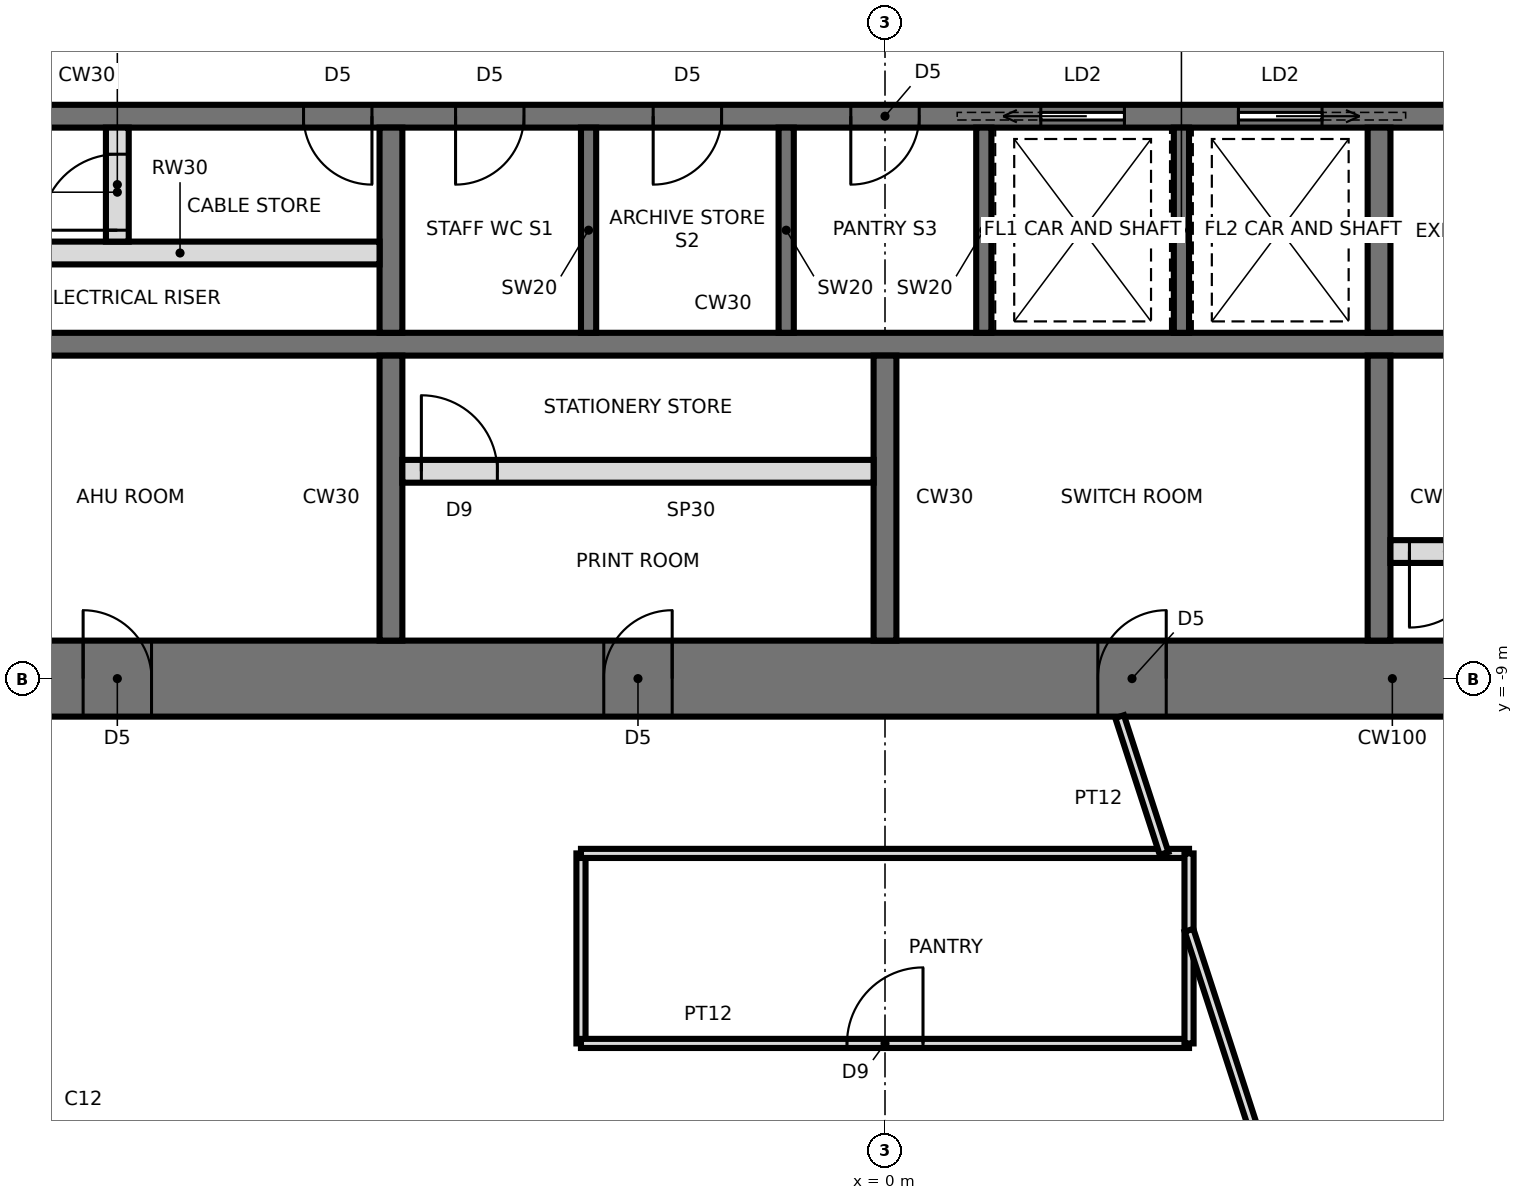
"""IFC4 building model, lengths in metres.
Left out: names, types, materials, properties, quantities, classifications, styles, units other than length and angle.
Written with IfcOpenShell. Run it as: python <this file> out.ifc"""

import sys

from ifc_helpers import new_model, si_unit, direction, frame, frame_2d, origin, place, context, subcontext, project, spatial, rectangle, extrude, element, fill, save


model = new_model("IFC4")
c1 = context("Model", 3, precision=1e-05, world=origin(), true_north=direction((0.0, 1.0)))
c2 = subcontext(c1, "Body", "Model", "MODEL_VIEW")
j1 = project(units=[si_unit("LENGTHUNIT", "METRE"), si_unit("PLANEANGLEUNIT", "RADIAN")], contexts=[c1])
p1 = place(None, origin())
s1 = spatial("IfcSite", under=j1, at=p1, CompositionType="ELEMENT")
p2 = place(p1, origin())
s2 = spatial("IfcBuilding", under=s1, at=p2, CompositionType="ELEMENT")
p3 = place(p2, frame((0.0, 0.0, 256.0)))
s3 = spatial("IfcBuildingStorey", under=s2, at=p3, CompositionType="ELEMENT", Elevation=256.0)
p4 = place(p3, frame((-13.2, -9.0, 0.0), z_axis=(0.0, 0.0, 1.0), x_axis=(1.0, 0.0, 0.0)))
e1 = element("IfcWall", 1, at=p4, inside=s3, PredefinedType="SHEAR", context=c2, shape_type="SweptSolid", body=[
    extrude(rectangle(XDim=26.4, YDim=1.0, at=frame_2d((13.2, 0.0))), origin(), (0.0, 0.0, 1.0), 4.2),
])
p5 = place(p4, frame((2.65, 0.0, 0.0)))
e2 = element("IfcOpeningElement", 2, at=p5, cuts=e1, PredefinedType="OPENING", context=c2, shape_type="SweptSolid", body=[
    extrude(rectangle(XDim=0.9, YDim=2.1, at=frame_2d((0.45, 1.05))), frame((0.0, 0.51, 0.0), z_axis=(0.0, -1.0, 0.0), x_axis=(1.0, 0.0, 0.0)), (0.0, 0.0, 1.0), 1.02),
])
p6 = place(p4, frame((9.5, 0.0, 0.0)))
e3 = element("IfcOpeningElement", 3, at=p6, cuts=e1, PredefinedType="OPENING", context=c2, shape_type="SweptSolid", body=[
    extrude(rectangle(XDim=0.9, YDim=2.1, at=frame_2d((0.45, 1.05))), frame((0.0, 0.51, 0.0), z_axis=(0.0, -1.0, 0.0), x_axis=(1.0, 0.0, 0.0)), (0.0, 0.0, 1.0), 1.02),
])
p7 = place(p4, frame((16.0, 0.0, 0.0)))
e4 = element("IfcOpeningElement", 4, at=p7, cuts=e1, PredefinedType="OPENING", context=c2, shape_type="SweptSolid", body=[
    extrude(rectangle(XDim=0.9, YDim=2.1, at=frame_2d((0.45, 1.05))), frame((0.0, 0.51, 0.0), z_axis=(0.0, -1.0, 0.0), x_axis=(1.0, 0.0, 0.0)), (0.0, 0.0, 1.0), 1.02),
])
p8 = place(p4, frame((22.85, 0.0, 0.0)))
e5 = element("IfcOpeningElement", 5, at=p8, cuts=e1, PredefinedType="OPENING", context=c2, shape_type="SweptSolid", body=[
    extrude(rectangle(XDim=0.9, YDim=2.1, at=frame_2d((0.45, 1.05))), frame((0.0, 0.51, 0.0), z_axis=(0.0, -1.0, 0.0), x_axis=(1.0, 0.0, 0.0)), (0.0, 0.0, 1.0), 1.02),
])
p9 = place(p3, frame((-13.2, -1.6, 0.0), z_axis=(0.0, 0.0, 1.0), x_axis=(1.0, 0.0, 0.0)))
e6 = element("IfcWall", 6, at=p9, inside=s3, PredefinedType="SHEAR", context=c2, shape_type="SweptSolid", body=[
    extrude(rectangle(XDim=26.4, YDim=0.3, at=frame_2d((13.2, 0.0))), origin(), (0.0, 0.0, 1.0), 4.2),
])
p10 = place(p9, frame((25.15, 0.0, 0.0)))
e7 = element("IfcOpeningElement", 7, at=p10, cuts=e6, PredefinedType="OPENING", context=c2, shape_type="SweptSolid", body=[
    extrude(rectangle(XDim=1.0, YDim=2.1, at=frame_2d((0.5, 1.05))), frame((0.0, 0.16, 0.0), z_axis=(0.0, -1.0, 0.0), x_axis=(1.0, 0.0, 0.0)), (0.0, 0.0, 1.0), 0.32),
])
p11 = place(p9, frame((7.55, 0.0, 0.0)))
e8 = element("IfcOpeningElement", 8, at=p11, cuts=e6, PredefinedType="OPENING", context=c2, shape_type="SweptSolid", body=[
    extrude(rectangle(XDim=0.9, YDim=2.1, at=frame_2d((0.45, 1.05))), frame((0.0, 0.16, 0.0), z_axis=(0.0, -1.0, 0.0), x_axis=(1.0, 0.0, 0.0)), (0.0, 0.0, 1.0), 0.32),
])
p12 = place(p9, frame((10.15, 0.0, 0.0)))
e9 = element("IfcOpeningElement", 9, at=p12, cuts=e6, PredefinedType="OPENING", context=c2, shape_type="SweptSolid", body=[
    extrude(rectangle(XDim=0.9, YDim=2.1, at=frame_2d((0.45, 1.05))), frame((0.0, 0.16, 0.0), z_axis=(0.0, -1.0, 0.0), x_axis=(1.0, 0.0, 0.0)), (0.0, 0.0, 1.0), 0.32),
])
p13 = place(p9, frame((12.75, 0.0, 0.0)))
e10 = element("IfcOpeningElement", 10, at=p13, cuts=e6, PredefinedType="OPENING", context=c2, shape_type="SweptSolid", body=[
    extrude(rectangle(XDim=0.9, YDim=2.1, at=frame_2d((0.45, 1.05))), frame((0.0, 0.16, 0.0), z_axis=(0.0, -1.0, 0.0), x_axis=(1.0, 0.0, 0.0)), (0.0, 0.0, 1.0), 0.32),
])
p14 = place(p9, frame((15.25, 0.0, 0.0)))
e11 = element("IfcOpeningElement", 11, at=p14, cuts=e6, PredefinedType="OPENING", context=c2, shape_type="SweptSolid", body=[
    extrude(rectangle(XDim=1.1, YDim=2.3, at=frame_2d((0.55, 1.15))), frame((0.0, 0.16, 0.0), z_axis=(0.0, -1.0, 0.0), x_axis=(1.0, 0.0, 0.0)), (0.0, 0.0, 1.0), 0.32),
])
p15 = place(p9, frame((17.85, 0.0, 0.0)))
e12 = element("IfcOpeningElement", 12, at=p15, cuts=e6, PredefinedType="OPENING", context=c2, shape_type="SweptSolid", body=[
    extrude(rectangle(XDim=1.1, YDim=2.3, at=frame_2d((0.55, 1.15))), frame((0.0, 0.16, 0.0), z_axis=(0.0, -1.0, 0.0), x_axis=(1.0, 0.0, 0.0)), (0.0, 0.0, 1.0), 0.32),
])
p16 = place(p9, frame((5.55, 0.0, 0.0)))
e13 = element("IfcOpeningElement", 13, at=p16, cuts=e6, PredefinedType="OPENING", context=c2, shape_type="SweptSolid", body=[
    extrude(rectangle(XDim=0.9, YDim=2.1, at=frame_2d((0.45, 1.05))), frame((0.0, 0.16, 0.0), z_axis=(0.0, -1.0, 0.0), x_axis=(1.0, 0.0, 0.0)), (0.0, 0.0, 1.0), 0.32),
])
p17 = place(p3, frame((-13.2, -4.6, 0.0), z_axis=(0.0, 0.0, 1.0), x_axis=(1.0, 0.0, 0.0)))
e14 = element("IfcWall", 14, at=p17, inside=s3, PredefinedType="SHEAR", context=c2, shape_type="SweptSolid", body=[
    extrude(rectangle(XDim=26.4, YDim=0.3, at=frame_2d((13.2, 0.0))), origin(), (0.0, 0.0, 1.0), 4.2),
])
p18 = place(p3, frame((-6.5, -1.75, 0.0), z_axis=(0.0, 0.0, 1.0), x_axis=(0.0, -1.0, 0.0)))
e15 = element("IfcWall", 15, at=p18, inside=s3, PredefinedType="SHEAR", context=c2, shape_type="SweptSolid", body=[
    extrude(rectangle(XDim=2.7, YDim=0.3, at=frame_2d((1.35, 0.0))), origin(), (0.0, 0.0, 1.0), 4.2),
])
p19 = place(p3, frame((-6.5, -4.75, 0.0), z_axis=(0.0, 0.0, 1.0), x_axis=(0.0, -1.0, 0.0)))
e16 = element("IfcWall", 16, at=p19, inside=s3, PredefinedType="SHEAR", context=c2, shape_type="SweptSolid", body=[
    extrude(rectangle(XDim=3.75, YDim=0.3, at=frame_2d((1.875, 0.0))), origin(), (0.0, 0.0, 1.0), 4.2),
])
p20 = place(p3, frame((6.5, -1.75, 0.0), z_axis=(0.0, 0.0, 1.0), x_axis=(0.0, -1.0, 0.0)))
e17 = element("IfcWall", 17, at=p20, inside=s3, PredefinedType="SHEAR", context=c2, shape_type="SweptSolid", body=[
    extrude(rectangle(XDim=2.7, YDim=0.3, at=frame_2d((1.35, 0.0))), origin(), (0.0, 0.0, 1.0), 4.2),
])
p21 = place(p3, frame((6.5, -4.75, 0.0), z_axis=(0.0, 0.0, 1.0), x_axis=(0.0, -1.0, 0.0)))
e18 = element("IfcWall", 18, at=p21, inside=s3, PredefinedType="SHEAR", context=c2, shape_type="SweptSolid", body=[
    extrude(rectangle(XDim=3.75, YDim=0.3, at=frame_2d((1.875, 0.0))), origin(), (0.0, 0.0, 1.0), 4.2),
])
for number, where, z_axis, x_axis in (
    (19, (-3.9, -1.75, 0.0), (0.0, 0.0, 1.0), (0.0, -1.0, 0.0)),
    (20, (-1.3, -1.75, 0.0), (0.0, 0.0, 1.0), (0.0, -1.0, 0.0)),
    (21, (1.3, -1.75, 0.0), (0.0, 0.0, 1.0), (0.0, -1.0, 0.0)),
    (22, (3.9, -1.75, 0.0), (0.0, 0.0, 1.0), (0.0, -1.0, 0.0)),
):
    element("IfcWall", number, at=place(p3, frame(where, z_axis=z_axis, x_axis=x_axis)), inside=s3, PredefinedType="SHEAR", context=c2, shape_type="SweptSolid", body=[
        extrude(rectangle(XDim=2.7, YDim=0.2, at=frame_2d((1.35, 0.0))), origin(), (0.0, 0.0, 1.0), 4.2),
    ])
p22 = place(p3, frame((0.0, -4.75, 0.0), z_axis=(0.0, 0.0, 1.0), x_axis=(0.0, -1.0, 0.0)))
e23 = element("IfcWall", 23, at=p22, inside=s3, PredefinedType="SHEAR", context=c2, shape_type="SweptSolid", body=[
    extrude(rectangle(XDim=3.75, YDim=0.3, at=frame_2d((1.875, 0.0))), origin(), (0.0, 0.0, 1.0), 4.2),
])
p23 = place(p3, frame((-6.35, -6.272, 0.0), z_axis=(0.0, 0.0, 1.0), x_axis=(1.0, 0.0, 0.0)))
e24 = element("IfcWall", 24, at=p23, inside=s3, PredefinedType="PARTITIONING", context=c2, shape_type="SweptSolid", body=[
    extrude(rectangle(XDim=6.2, YDim=0.3, at=frame_2d((3.1, 0.0))), origin(), (0.0, 0.0, 1.0), 4.04),
])
p24 = place(p23, frame((0.25, 0.0, 0.0)))
e25 = element("IfcOpeningElement", 25, at=p24, cuts=e24, PredefinedType="OPENING", context=c2, shape_type="SweptSolid", body=[
    extrude(rectangle(XDim=1.0, YDim=2.4, at=frame_2d((0.5, 1.2))), frame((0.0, 0.16, 0.0), z_axis=(0.0, -1.0, 0.0), x_axis=(1.0, 0.0, 0.0)), (0.0, 0.0, 1.0), 0.32),
])
p25 = place(p3, frame((6.65, -7.328, 0.0), z_axis=(0.0, 0.0, 1.0), x_axis=(1.0, 0.0, 0.0)))
e26 = element("IfcWall", 26, at=p25, inside=s3, PredefinedType="PARTITIONING", context=c2, shape_type="SweptSolid", body=[
    extrude(rectangle(XDim=6.55, YDim=0.3, at=frame_2d((3.275, 0.0))), origin(), (0.0, 0.0, 1.0), 4.04),
])
p26 = place(p25, frame((0.25, 0.0, 0.0)))
e27 = element("IfcOpeningElement", 27, at=p26, cuts=e26, PredefinedType="OPENING", context=c2, shape_type="SweptSolid", body=[
    extrude(rectangle(XDim=1.0, YDim=2.4, at=frame_2d((0.5, 1.2))), frame((0.0, 0.16, 0.0), z_axis=(0.0, -1.0, 0.0), x_axis=(1.0, 0.0, 0.0)), (0.0, 0.0, 1.0), 0.32),
])
p27 = place(p3, frame((-13.2, -3.4, 0.0), z_axis=(0.0, 0.0, 1.0), x_axis=(1.0, 0.0, 0.0)))
e28 = element("IfcWall", 28, at=p27, inside=s3, PredefinedType="SOLIDWALL", context=c2, shape_type="SweptSolid", body=[
    extrude(rectangle(XDim=6.55, YDim=0.3, at=frame_2d((3.275, 0.0))), origin(), (0.0, 0.0, 1.0), 4.04),
])
p28 = place(p27, frame((0.25, 0.0, 0.0)))
e29 = element("IfcOpeningElement", 29, at=p28, cuts=e28, PredefinedType="OPENING", context=c2, shape_type="SweptSolid", body=[
    extrude(rectangle(XDim=0.9, YDim=2.1, at=frame_2d((0.45, 1.05))), frame((0.0, 0.16, 0.0), z_axis=(0.0, -1.0, 0.0), x_axis=(1.0, 0.0, 0.0)), (0.0, 0.0, 1.0), 0.32),
])
p29 = place(p3, frame((-10.1, -3.25, 0.0), z_axis=(0.0, 0.0, 1.0), x_axis=(0.0, 1.0, 0.0)))
e30 = element("IfcWall", 30, at=p29, inside=s3, PredefinedType="PARTITIONING", context=c2, shape_type="SweptSolid", body=[
    extrude(rectangle(XDim=1.5, YDim=0.3, at=frame_2d((0.75, 0.0))), origin(), (0.0, 0.0, 1.0), 4.04),
])
p30 = place(p29, frame((0.15, 0.0, 0.0)))
e31 = element("IfcOpeningElement", 31, at=p30, cuts=e30, PredefinedType="OPENING", context=c2, shape_type="SweptSolid", body=[
    extrude(rectangle(XDim=1.0, YDim=2.4, at=frame_2d((0.5, 1.2))), frame((0.0, 0.16, 0.0), z_axis=(0.0, -1.0, 0.0), x_axis=(1.0, 0.0, 0.0)), (0.0, 0.0, 1.0), 0.32),
])
p31 = place(p3, frame((-4.0, -11.3, 0.0), z_axis=(0.0, 0.0, 1.0), x_axis=(0.0, -1.0, 0.0)))
e32 = element("IfcWall", 32, at=p31, inside=s3, PredefinedType="PARTITIONING", context=c2, shape_type="SweptSolid", body=[
    extrude(rectangle(XDim=2.5, YDim=0.12, at=frame_2d((1.25, 0.0))), origin(), (0.0, 0.0, 1.0), 4.04),
])
p32 = place(p3, frame((-4.0, -13.8, 0.0), z_axis=(0.0, 0.0, 1.0), x_axis=(1.0, 0.0, 0.0)))
e33 = element("IfcWall", 33, at=p32, inside=s3, PredefinedType="PARTITIONING", context=c2, shape_type="SweptSolid", body=[
    extrude(rectangle(XDim=8.0, YDim=0.12, at=frame_2d((4.0, 0.0))), origin(), (0.0, 0.0, 1.0), 4.04),
])
p33 = place(p32, frame((3.5, 0.0, 0.0)))
e34 = element("IfcOpeningElement", 34, at=p33, cuts=e33, PredefinedType="OPENING", context=c2, shape_type="SweptSolid", body=[
    extrude(rectangle(XDim=1.0, YDim=2.4, at=frame_2d((0.5, 1.2))), frame((0.0, 0.07, 0.0), z_axis=(0.0, -1.0, 0.0), x_axis=(1.0, 0.0, 0.0)), (0.0, 0.0, 1.0), 0.14),
])
p34 = place(p3, frame((4.0, -11.3, 0.0), z_axis=(0.0, 0.0, 1.0), x_axis=(-1.0, 0.0, 0.0)))
e35 = element("IfcWall", 35, at=p34, inside=s3, PredefinedType="PARTITIONING", context=c2, shape_type="SweptSolid", body=[
    extrude(rectangle(XDim=8.0, YDim=0.12, at=frame_2d((4.0, 0.0))), origin(), (0.0, 0.0, 1.0), 4.04),
])
p35 = place(p3, frame((4.0, -13.8, 0.0), z_axis=(0.0, 0.0, 1.0), x_axis=(0.0, 1.0, 0.0)))
e36 = element("IfcWall", 36, at=p35, inside=s3, PredefinedType="PARTITIONING", context=c2, shape_type="SweptSolid", body=[
    extrude(rectangle(XDim=2.5, YDim=0.12, at=frame_2d((1.25, 0.0))), origin(), (0.0, 0.0, 1.0), 4.04),
])
p36 = place(p3, frame((6.137, -18.889, 0.0), z_axis=(0.0, 0.0, 1.0), x_axis=(-0.309007859613, 0.951059484311, 0.0)))
e37 = element("IfcWall", 37, at=p36, inside=s3, PredefinedType="PARTITIONING", context=c2, shape_type="SweptSolid", body=[
    extrude(rectangle(XDim=6.917, YDim=0.12, at=frame_2d((3.458, 0.0))), origin(), (0.0, 0.0, 1.0), 3.24),
])
p37 = place(p3, frame((3.672, -11.3, 0.0), z_axis=(0.0, 0.0, 1.0), x_axis=(-0.309059822154, 0.95104259964, 0.0)))
e38 = element("IfcWall", 38, at=p37, inside=s3, PredefinedType="PARTITIONING", context=c2, shape_type="SweptSolid", body=[
    extrude(rectangle(XDim=1.893, YDim=0.12, at=frame_2d((0.946, 0.0))), origin(), (0.0, 0.0, 1.0), 3.24),
])
p38 = place(p11, frame((0.9, 0.0, 0.0), z_axis=(0.0, 0.0, 1.0), x_axis=(-1.0, 0.0, 0.0)))
e39 = element("IfcDoor", 39, at=p38, inside=s3, OperationType="SINGLE_SWING_RIGHT", PredefinedType="DOOR", context=c2, shape_type="SweptSolid", body=[
    extrude(rectangle(XDim=0.9, YDim=2.1, at=frame_2d((0.45, 1.05))), frame((0.0, 0.025, 0.0), z_axis=(0.0, -1.0, 0.0), x_axis=(1.0, 0.0, 0.0)), (0.0, 0.0, 1.0), 0.05),
])
fill(e8, e39)
p39 = place(p12, frame((0.9, 0.0, 0.0), z_axis=(0.0, 0.0, 1.0), x_axis=(-1.0, 0.0, 0.0)))
e40 = element("IfcDoor", 40, at=p39, inside=s3, OperationType="SINGLE_SWING_RIGHT", PredefinedType="DOOR", context=c2, shape_type="SweptSolid", body=[
    extrude(rectangle(XDim=0.9, YDim=2.1, at=frame_2d((0.45, 1.05))), frame((0.0, 0.025, 0.0), z_axis=(0.0, -1.0, 0.0), x_axis=(1.0, 0.0, 0.0)), (0.0, 0.0, 1.0), 0.05),
])
fill(e9, e40)
p40 = place(p13, frame((0.9, 0.0, 0.0), z_axis=(0.0, 0.0, 1.0), x_axis=(-1.0, 0.0, 0.0)))
e41 = element("IfcDoor", 41, at=p40, inside=s3, OperationType="SINGLE_SWING_RIGHT", PredefinedType="DOOR", context=c2, shape_type="SweptSolid", body=[
    extrude(rectangle(XDim=0.9, YDim=2.1, at=frame_2d((0.45, 1.05))), frame((0.0, 0.025, 0.0), z_axis=(0.0, -1.0, 0.0), x_axis=(1.0, 0.0, 0.0)), (0.0, 0.0, 1.0), 0.05),
])
fill(e10, e41)
p41 = place(p14, frame((1.1, 0.0, 0.0), z_axis=(0.0, 0.0, 1.0), x_axis=(-1.0, 0.0, 0.0)))
e42 = element("IfcDoor", 42, at=p41, inside=s3, OperationType="SLIDING_TO_RIGHT", PredefinedType="DOOR", context=c2, shape_type="SweptSolid", body=[
    extrude(rectangle(XDim=1.1, YDim=2.3, at=frame_2d((0.55, 1.15))), frame((0.0, 0.025, 0.0), z_axis=(0.0, -1.0, 0.0), x_axis=(1.0, 0.0, 0.0)), (0.0, 0.0, 1.0), 0.05),
])
fill(e11, e42)
p42 = place(p15, frame((1.1, 0.0, 0.0), z_axis=(0.0, 0.0, 1.0), x_axis=(-1.0, 0.0, 0.0)))
e43 = element("IfcDoor", 43, at=p42, inside=s3, OperationType="SLIDING_TO_LEFT", PredefinedType="DOOR", context=c2, shape_type="SweptSolid", body=[
    extrude(rectangle(XDim=1.1, YDim=2.3, at=frame_2d((0.55, 1.15))), frame((0.0, 0.025, 0.0), z_axis=(0.0, -1.0, 0.0), x_axis=(1.0, 0.0, 0.0)), (0.0, 0.0, 1.0), 0.05),
])
fill(e12, e43)
p43 = place(p16, frame((0.9, 0.0, 0.0), z_axis=(0.0, 0.0, 1.0), x_axis=(-1.0, 0.0, 0.0)))
e44 = element("IfcDoor", 44, at=p43, inside=s3, OperationType="SINGLE_SWING_LEFT", PredefinedType="DOOR", context=c2, shape_type="SweptSolid", body=[
    extrude(rectangle(XDim=0.9, YDim=2.1, at=frame_2d((0.45, 1.05))), frame((0.0, 0.025, 0.0), z_axis=(0.0, -1.0, 0.0), x_axis=(1.0, 0.0, 0.0)), (0.0, 0.0, 1.0), 0.05),
])
fill(e13, e44)
p44 = place(p5, origin())
e45 = element("IfcDoor", 45, at=p44, inside=s3, OperationType="SINGLE_SWING_LEFT", PredefinedType="DOOR", context=c2, shape_type="SweptSolid", body=[
    extrude(rectangle(XDim=0.82, YDim=2.06, at=frame_2d((0.45, 1.03))), frame((0.0, 0.025, 0.0), z_axis=(0.0, -1.0, 0.0), x_axis=(1.0, 0.0, 0.0)), (0.0, 0.0, 1.0), 0.05),
    extrude(rectangle(XDim=0.04, YDim=2.1, at=frame_2d((0.02, 1.05))), frame((0.0, 0.25, 0.0), z_axis=(0.0, -1.0, 0.0), x_axis=(1.0, 0.0, 0.0)), (0.0, 0.0, 1.0), 0.5),
    extrude(rectangle(XDim=0.04, YDim=2.1, at=frame_2d((0.88, 1.05))), frame((0.0, 0.25, 0.0), z_axis=(0.0, -1.0, 0.0), x_axis=(1.0, 0.0, 0.0)), (0.0, 0.0, 1.0), 0.5),
    extrude(rectangle(XDim=0.82, YDim=0.04, at=frame_2d((0.45, 2.08))), frame((0.0, 0.25, 0.0), z_axis=(0.0, -1.0, 0.0), x_axis=(1.0, 0.0, 0.0)), (0.0, 0.0, 1.0), 0.5),
])
fill(e2, e45)
p45 = place(p6, origin())
e46 = element("IfcDoor", 46, at=p45, inside=s3, OperationType="SINGLE_SWING_RIGHT", PredefinedType="DOOR", context=c2, shape_type="SweptSolid", body=[
    extrude(rectangle(XDim=0.82, YDim=2.06, at=frame_2d((0.45, 1.03))), frame((0.0, 0.025, 0.0), z_axis=(0.0, -1.0, 0.0), x_axis=(1.0, 0.0, 0.0)), (0.0, 0.0, 1.0), 0.05),
    extrude(rectangle(XDim=0.04, YDim=2.1, at=frame_2d((0.02, 1.05))), frame((0.0, 0.25, 0.0), z_axis=(0.0, -1.0, 0.0), x_axis=(1.0, 0.0, 0.0)), (0.0, 0.0, 1.0), 0.5),
    extrude(rectangle(XDim=0.04, YDim=2.1, at=frame_2d((0.88, 1.05))), frame((0.0, 0.25, 0.0), z_axis=(0.0, -1.0, 0.0), x_axis=(1.0, 0.0, 0.0)), (0.0, 0.0, 1.0), 0.5),
    extrude(rectangle(XDim=0.82, YDim=0.04, at=frame_2d((0.45, 2.08))), frame((0.0, 0.25, 0.0), z_axis=(0.0, -1.0, 0.0), x_axis=(1.0, 0.0, 0.0)), (0.0, 0.0, 1.0), 0.5),
])
fill(e3, e46)
p46 = place(p7, origin())
e47 = element("IfcDoor", 47, at=p46, inside=s3, OperationType="SINGLE_SWING_RIGHT", PredefinedType="DOOR", context=c2, shape_type="SweptSolid", body=[
    extrude(rectangle(XDim=0.82, YDim=2.06, at=frame_2d((0.45, 1.03))), frame((0.0, 0.025, 0.0), z_axis=(0.0, -1.0, 0.0), x_axis=(1.0, 0.0, 0.0)), (0.0, 0.0, 1.0), 0.05),
    extrude(rectangle(XDim=0.04, YDim=2.1, at=frame_2d((0.02, 1.05))), frame((0.0, 0.25, 0.0), z_axis=(0.0, -1.0, 0.0), x_axis=(1.0, 0.0, 0.0)), (0.0, 0.0, 1.0), 0.5),
    extrude(rectangle(XDim=0.04, YDim=2.1, at=frame_2d((0.88, 1.05))), frame((0.0, 0.25, 0.0), z_axis=(0.0, -1.0, 0.0), x_axis=(1.0, 0.0, 0.0)), (0.0, 0.0, 1.0), 0.5),
    extrude(rectangle(XDim=0.82, YDim=0.04, at=frame_2d((0.45, 2.08))), frame((0.0, 0.25, 0.0), z_axis=(0.0, -1.0, 0.0), x_axis=(1.0, 0.0, 0.0)), (0.0, 0.0, 1.0), 0.5),
])
fill(e4, e47)
p47 = place(p24, origin())
e48 = element("IfcDoor", 48, at=p47, inside=s3, OperationType="SINGLE_SWING_LEFT", PredefinedType="DOOR", context=c2, shape_type="SweptSolid", body=[
    extrude(rectangle(XDim=1.0, YDim=2.4, at=frame_2d((0.5, 1.2))), frame((0.0, 0.025, 0.0), z_axis=(0.0, -1.0, 0.0), x_axis=(1.0, 0.0, 0.0)), (0.0, 0.0, 1.0), 0.05),
])
fill(e25, e48)
p48 = place(p26, frame((1.0, 0.0, 0.0), z_axis=(0.0, 0.0, 1.0), x_axis=(-1.0, 0.0, 0.0)))
e49 = element("IfcDoor", 49, at=p48, inside=s3, OperationType="SINGLE_SWING_RIGHT", PredefinedType="DOOR", context=c2, shape_type="SweptSolid", body=[
    extrude(rectangle(XDim=1.0, YDim=2.4, at=frame_2d((0.5, 1.2))), frame((0.0, 0.025, 0.0), z_axis=(0.0, -1.0, 0.0), x_axis=(1.0, 0.0, 0.0)), (0.0, 0.0, 1.0), 0.05),
])
fill(e27, e49)
p49 = place(p30, origin())
e50 = element("IfcDoor", 50, at=p49, inside=s3, OperationType="SINGLE_SWING_LEFT", PredefinedType="DOOR", context=c2, shape_type="SweptSolid", body=[
    extrude(rectangle(XDim=1.0, YDim=2.4, at=frame_2d((0.5, 1.2))), frame((0.0, 0.025, 0.0), z_axis=(0.0, -1.0, 0.0), x_axis=(1.0, 0.0, 0.0)), (0.0, 0.0, 1.0), 0.05),
])
fill(e31, e50)
p50 = place(p33, origin())
e51 = element("IfcDoor", 51, at=p50, inside=s3, OperationType="SINGLE_SWING_RIGHT", PredefinedType="DOOR", context=c2, shape_type="SweptSolid", body=[
    extrude(rectangle(XDim=1.0, YDim=2.4, at=frame_2d((0.5, 1.2))), frame((0.0, 0.025, 0.0), z_axis=(0.0, -1.0, 0.0), x_axis=(1.0, 0.0, 0.0)), (0.0, 0.0, 1.0), 0.05),
])
fill(e34, e51)
save(model, sys.argv[1])
